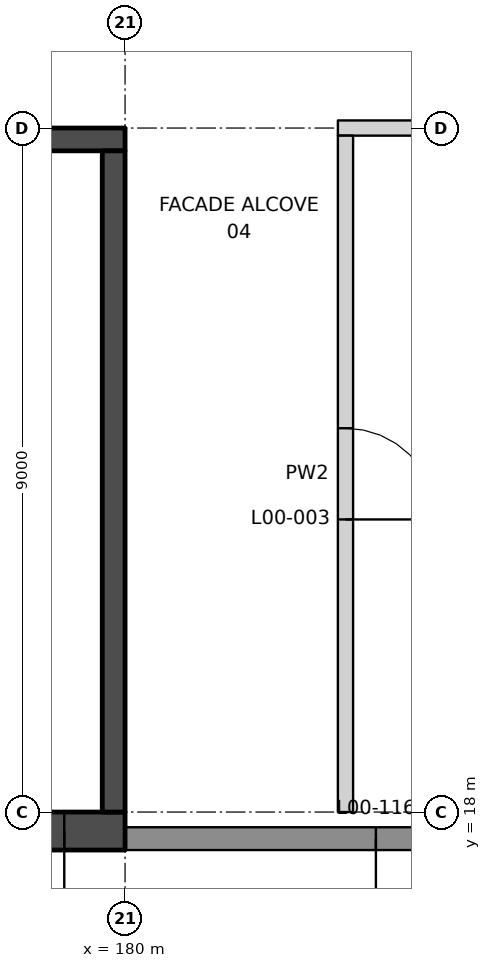
"""IFC4 building model, lengths in metres.
Left out: names, types, materials, properties, quantities, classifications, styles, units other than length and angle.
Written with IfcOpenShell. Run it as: python <this file> out.ifc"""

import sys

from ifc_helpers import new_model, si_unit, direction, frame, frame_2d, origin, place, context, subcontext, project, spatial, rectangle, extrude, element, fill, save


model = new_model("IFC4")
c1 = context("Model", 3, precision=1e-05, world=origin(), true_north=direction((0.0, 1.0)))
c2 = subcontext(c1, "Body", "Model", "MODEL_VIEW")
j1 = project(units=[si_unit("LENGTHUNIT", "METRE"), si_unit("PLANEANGLEUNIT", "RADIAN")], contexts=[c1])
p1 = place(None, origin())
s1 = spatial("IfcSite", under=j1, at=p1, CompositionType="ELEMENT")
p2 = place(p1, origin())
s2 = spatial("IfcBuilding", under=s1, at=p2, CompositionType="ELEMENT")
p3 = place(p2, origin())
s3 = spatial("IfcBuildingStorey", under=s2, at=p3, CompositionType="ELEMENT", Elevation=0.0)
p4 = place(p3, frame((182.8, 27.0, 0.0), z_axis=(0.0, 0.0, 1.0), x_axis=(1.0, 0.0, 0.0)))
e1 = element("IfcWall", 1, at=p4, inside=s3, PredefinedType="PARTITIONING", context=c2, shape_type="SweptSolid", body=[
    extrude(rectangle(XDim=6.2, YDim=0.2, at=frame_2d((3.1, 0.0))), origin(), (0.0, 0.0, 1.0), 5.65),
])
p5 = place(p3, frame((182.9, 18.0, 0.0), z_axis=(0.0, 0.0, 1.0), x_axis=(0.0, 1.0, 0.0)))
e2 = element("IfcWall", 2, at=p5, inside=s3, PredefinedType="PARTITIONING", context=c2, shape_type="SweptSolid", body=[
    extrude(rectangle(XDim=8.9, YDim=0.2, at=frame_2d((4.45, 0.0))), origin(), (0.0, 0.0, 1.0), 7.0),
])
p6 = place(p5, frame((3.85, 0.0, 0.0)))
e3 = element("IfcOpeningElement", 3, at=p6, cuts=e2, PredefinedType="OPENING", context=c2, shape_type="SweptSolid", body=[
    extrude(rectangle(XDim=1.2, YDim=2.1, at=frame_2d((0.6, 1.05))), frame((0.0, 0.11, 0.0), z_axis=(0.0, -1.0, 0.0), x_axis=(1.0, 0.0, 0.0)), (0.0, 0.0, 1.0), 0.22),
])
p7 = place(p3, frame((180.0, 17.65, 0.0), z_axis=(0.0, 0.0, 1.0), x_axis=(1.0, 0.0, 0.0)))
e4 = element("IfcWall", 4, at=p7, inside=s3, PredefinedType="SOLIDWALL", context=c2, shape_type="SweptSolid", body=[
    extrude(rectangle(XDim=9.0, YDim=0.3, at=frame_2d((4.5, 0.0))), origin(), (0.0, 0.0, 1.0), 7.0),
])
p8 = place(p7, frame((3.3, 0.0, 0.0)))
e5 = element("IfcOpeningElement", 5, at=p8, cuts=e4, PredefinedType="OPENING", context=c2, shape_type="SweptSolid", body=[
    extrude(rectangle(XDim=2.4, YDim=2.4, at=frame_2d((1.2, 1.2))), frame((0.0, 0.16, 0.0), z_axis=(0.0, -1.0, 0.0), x_axis=(1.0, 0.0, 0.0)), (0.0, 0.0, 1.0), 0.32),
])
p9 = place(p3, frame((180.0, 26.85, 0.0), z_axis=(0.0, 0.0, 1.0), x_axis=(-1.0, 0.0, 0.0)))
e6 = element("IfcWall", 6, at=p9, inside=s3, PredefinedType="SHEAR", context=c2, shape_type="SweptSolid", body=[
    extrude(rectangle(XDim=18.0, YDim=0.3, at=frame_2d((9.0, 0.0))), origin(), (0.0, 0.0, 1.0), 7.0),
])
p10 = place(p9, frame((1.5, 0.0, 0.0)))
e7 = element("IfcOpeningElement", 7, at=p10, cuts=e6, PredefinedType="OPENING", context=c2, shape_type="SweptSolid", body=[
    extrude(rectangle(XDim=1.2, YDim=2.1, at=frame_2d((0.6, 1.05))), frame((0.0, 0.16, 0.0), z_axis=(0.0, -1.0, 0.0), x_axis=(1.0, 0.0, 0.0)), (0.0, 0.0, 1.0), 0.32),
])
p11 = place(p3, frame((180.0, 17.75, 0.0), z_axis=(0.0, 0.0, 1.0), x_axis=(-1.0, 0.0, 0.0)))
e8 = element("IfcWall", 8, at=p11, inside=s3, PredefinedType="SHEAR", context=c2, shape_type="SweptSolid", body=[
    extrude(rectangle(XDim=18.0, YDim=0.5, at=frame_2d((9.0, 0.0))), origin(), (0.0, 0.0, 1.0), 7.0),
])
p12 = place(p11, frame((0.8, 0.0, 0.0)))
e9 = element("IfcOpeningElement", 9, at=p12, cuts=e8, PredefinedType="OPENING", context=c2, shape_type="SweptSolid", body=[
    extrude(rectangle(XDim=2.6, YDim=2.4, at=frame_2d((1.3, 1.2))), frame((0.0, 0.26, 0.0), z_axis=(0.0, -1.0, 0.0), x_axis=(1.0, 0.0, 0.0)), (0.0, 0.0, 1.0), 0.52),
])
p13 = place(p3, frame((179.85, 26.7, 0.0), z_axis=(0.0, 0.0, 1.0), x_axis=(0.0, -1.0, 0.0)))
e10 = element("IfcWall", 10, at=p13, inside=s3, PredefinedType="SHEAR", context=c2, shape_type="SweptSolid", body=[
    extrude(rectangle(XDim=8.7, YDim=0.3, at=frame_2d((4.35, 0.0))), origin(), (0.0, 0.0, 1.0), 7.0),
])
p14 = place(p6, frame((1.2, 0.0, 0.0), z_axis=(0.0, 0.0, 1.0), x_axis=(-1.0, 0.0, 0.0)))
e11 = element("IfcDoor", 11, at=p14, inside=s3, OperationType="SINGLE_SWING_RIGHT", PredefinedType="DOOR", context=c2, shape_type="SweptSolid", body=[
    extrude(rectangle(XDim=1.2, YDim=2.1, at=frame_2d((0.6, 1.05))), frame((0.0, 0.025, 0.0), z_axis=(0.0, -1.0, 0.0), x_axis=(1.0, 0.0, 0.0)), (0.0, 0.0, 1.0), 0.05),
])
fill(e3, e11)
p15 = place(p8, frame((2.4, 0.0, 0.0), z_axis=(0.0, 0.0, 1.0), x_axis=(-1.0, 0.0, 0.0)))
e12 = element("IfcDoor", 12, at=p15, inside=s3, OperationType="DOUBLE_DOOR_SINGLE_SWING", PredefinedType="DOOR", context=c2, shape_type="SweptSolid", body=[
    extrude(rectangle(XDim=2.4, YDim=2.4, at=frame_2d((1.2, 1.2))), frame((0.0, 0.025, 0.0), z_axis=(0.0, -1.0, 0.0), x_axis=(1.0, 0.0, 0.0)), (0.0, 0.0, 1.0), 0.05),
])
fill(e5, e12)
p16 = place(p12, origin())
e13 = element("IfcDoor", 13, at=p16, inside=s3, OperationType="DOUBLE_DOOR_SINGLE_SWING", PredefinedType="DOOR", context=c2, shape_type="SweptSolid", body=[
    extrude(rectangle(XDim=2.6, YDim=2.4, at=frame_2d((1.3, 1.2))), frame((0.0, 0.025, 0.0), z_axis=(0.0, -1.0, 0.0), x_axis=(1.0, 0.0, 0.0)), (0.0, 0.0, 1.0), 0.05),
])
fill(e9, e13)
save(model, sys.argv[1])
